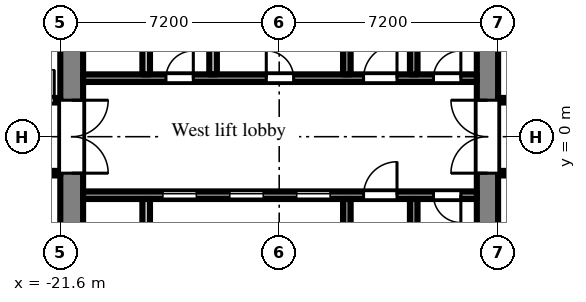
"""IFC4 building model, lengths in metres.
Left out: names, types, materials, properties, quantities, classifications, styles, units other than length and angle.
Written with IfcOpenShell. Run it as: python <this file> out.ifc"""

import sys

from ifc_helpers import new_model, si_unit, direction, frame, frame_2d, origin, place, context, subcontext, project, spatial, rectangle, extrude, element, fill, save


model = new_model("IFC4")
c1 = context("Model", 3, precision=1e-05, world=origin(), true_north=direction((0.0, 1.0)))
c2 = subcontext(c1, "Body", "Model", "MODEL_VIEW")
j1 = project(units=[si_unit("LENGTHUNIT", "METRE"), si_unit("PLANEANGLEUNIT", "RADIAN")], contexts=[c1])
p1 = place(None, origin())
s1 = spatial("IfcSite", under=j1, at=p1, CompositionType="ELEMENT")
p2 = place(p1, origin())
s2 = spatial("IfcBuilding", under=s1, at=p2, CompositionType="ELEMENT")
p3 = place(p2, frame((0.0, 0.0, 53.7)))
s3 = spatial("IfcBuildingStorey", under=s2, at=p3, CompositionType="ELEMENT", Elevation=53.7)
p4 = place(p3, frame((-7.55, -7.2, 0.0), z_axis=(0.0, 0.0, 1.0), x_axis=(0.0, 1.0, 0.0)))
e1 = element("IfcWall", 1, at=p4, inside=s3, PredefinedType="SHEAR", context=c2, shape_type="SweptSolid", body=[
    extrude(rectangle(XDim=14.4, YDim=0.7, at=frame_2d((7.2, 0.0))), origin(), (0.0, 0.0, 1.0), 2.575),
])
p5 = place(p4, frame((6.0, 0.0, 0.0)))
e2 = element("IfcOpeningElement", 2, at=p5, cuts=e1, PredefinedType="OPENING", context=c2, shape_type="SweptSolid", body=[
    extrude(rectangle(XDim=2.4, YDim=2.2, at=frame_2d((1.2, 1.1))), frame((0.0, 0.36, 0.0), z_axis=(0.0, -1.0, 0.0), x_axis=(1.0, 0.0, 0.0)), (0.0, 0.0, 1.0), 0.72),
])
p6 = place(p3, frame((-21.225, -7.2, 0.0), z_axis=(0.0, 0.0, 1.0), x_axis=(0.0, 1.0, 0.0)))
e3 = element("IfcWall", 3, at=p6, inside=s3, PredefinedType="SHEAR", context=c2, shape_type="SweptSolid", body=[
    extrude(rectangle(XDim=14.4, YDim=0.75, at=frame_2d((7.2, 0.0))), origin(), (0.0, 0.0, 1.0), 2.575),
])
p7 = place(p6, frame((6.0, 0.0, 0.0)))
e4 = element("IfcOpeningElement", 4, at=p7, cuts=e3, PredefinedType="OPENING", context=c2, shape_type="SweptSolid", body=[
    extrude(rectangle(XDim=2.4, YDim=2.2, at=frame_2d((1.2, 1.1))), frame((0.0, 0.385, 0.0), z_axis=(0.0, -1.0, 0.0), x_axis=(1.0, 0.0, 0.0)), (0.0, 0.0, 1.0), 0.77),
])
p8 = place(p3, frame((-7.9, 1.925, 0.0), z_axis=(0.0, 0.0, 1.0), x_axis=(-1.0, 0.0, 0.0)))
e5 = element("IfcWall", 5, at=p8, inside=s3, PredefinedType="SHEAR", context=c2, shape_type="SweptSolid", body=[
    extrude(rectangle(XDim=12.95, YDim=0.25, at=frame_2d((6.475, 0.0))), origin(), (0.0, 0.0, 1.0), 2.575),
])
p9 = place(p8, frame((0.525, 0.0, 0.0)))
e6 = element("IfcOpeningElement", 6, at=p9, cuts=e5, PredefinedType="OPENING", context=c2, shape_type="SweptSolid", body=[
    extrude(rectangle(XDim=0.9, YDim=2.1, at=frame_2d((0.45, 1.05))), frame((0.0, 0.135, 0.0), z_axis=(0.0, -1.0, 0.0), x_axis=(1.0, 0.0, 0.0)), (0.0, 0.0, 1.0), 0.27),
])
p10 = place(p8, frame((2.625, 0.0, 0.0)))
e7 = element("IfcOpeningElement", 7, at=p10, cuts=e5, PredefinedType="OPENING", context=c2, shape_type="SweptSolid", body=[
    extrude(rectangle(XDim=1.1, YDim=2.1, at=frame_2d((0.55, 1.05))), frame((0.0, 0.135, 0.0), z_axis=(0.0, -1.0, 0.0), x_axis=(1.0, 0.0, 0.0)), (0.0, 0.0, 1.0), 0.27),
])
p11 = place(p8, frame((6.025, 0.0, 0.0)))
e8 = element("IfcOpeningElement", 8, at=p11, cuts=e5, PredefinedType="OPENING", context=c2, shape_type="SweptSolid", body=[
    extrude(rectangle(XDim=0.9, YDim=2.1, at=frame_2d((0.45, 1.05))), frame((0.0, 0.135, 0.0), z_axis=(0.0, -1.0, 0.0), x_axis=(1.0, 0.0, 0.0)), (0.0, 0.0, 1.0), 0.27),
])
p12 = place(p8, frame((9.325, 0.0, 0.0)))
e9 = element("IfcOpeningElement", 9, at=p12, cuts=e5, PredefinedType="OPENING", context=c2, shape_type="SweptSolid", body=[
    extrude(rectangle(XDim=0.9, YDim=2.1, at=frame_2d((0.45, 1.05))), frame((0.0, 0.135, 0.0), z_axis=(0.0, -1.0, 0.0), x_axis=(1.0, 0.0, 0.0)), (0.0, 0.0, 1.0), 0.27),
])
p13 = place(p3, frame((-9.975, 2.05, 0.0), z_axis=(0.0, 0.0, 1.0), x_axis=(0.0, 1.0, 0.0)))
e10 = element("IfcWall", 10, at=p13, inside=s3, PredefinedType="SHEAR", context=c2, shape_type="SweptSolid", body=[
    extrude(rectangle(XDim=4.65, YDim=0.25, at=frame_2d((2.325, 0.0))), origin(), (0.0, 0.0, 1.0), 2.575),
])
p14 = place(p13, frame((2.95, 0.0, 0.0)))
e11 = element("IfcOpeningElement", 11, at=p14, cuts=e10, PredefinedType="OPENING", context=c2, shape_type="SweptSolid", body=[
    extrude(rectangle(XDim=1.1, YDim=2.1, at=frame_2d((0.55, 1.05))), frame((0.0, 0.135, 0.0), z_axis=(0.0, -1.0, 0.0), x_axis=(1.0, 0.0, 0.0)), (0.0, 0.0, 1.0), 0.27),
])
p15 = place(p3, frame((-12.175, 2.05, 0.0), z_axis=(0.0, 0.0, 1.0), x_axis=(0.0, 1.0, 0.0)))
e12 = element("IfcWall", 12, at=p15, inside=s3, PredefinedType="SHEAR", context=c2, shape_type="SweptSolid", body=[
    extrude(rectangle(XDim=4.65, YDim=0.25, at=frame_2d((2.325, 0.0))), origin(), (0.0, 0.0, 1.0), 2.575),
])
p16 = place(p15, frame((2.95, 0.0, 0.0)))
e13 = element("IfcOpeningElement", 13, at=p16, cuts=e12, PredefinedType="OPENING", context=c2, shape_type="SweptSolid", body=[
    extrude(rectangle(XDim=1.1, YDim=2.1, at=frame_2d((0.55, 1.05))), frame((0.0, 0.135, 0.0), z_axis=(0.0, -1.0, 0.0), x_axis=(1.0, 0.0, 0.0)), (0.0, 0.0, 1.0), 0.27),
])
for number, where, z_axis, x_axis in (
    (14, (-16.575, 2.05, 0.0), (0.0, 0.0, 1.0), (0.0, 1.0, 0.0)),
    (15, (-18.775, 2.05, 0.0), (0.0, 0.0, 1.0), (0.0, 1.0, 0.0)),
):
    element("IfcWall", number, at=place(p3, frame(where, z_axis=z_axis, x_axis=x_axis)), inside=s3, PredefinedType="PARTITIONING", context=c2, shape_type="SweptSolid", body=[
        extrude(rectangle(XDim=2.1, YDim=0.25, at=frame_2d((1.05, 0.0))), origin(), (0.0, 0.0, 1.0), 2.575),
    ])
p17 = place(p3, frame((-7.9, -1.925, 0.0), z_axis=(0.0, 0.0, 1.0), x_axis=(-1.0, 0.0, 0.0)))
e16 = element("IfcWall", 16, at=p17, inside=s3, PredefinedType="SHEAR", context=c2, shape_type="SweptSolid", body=[
    extrude(rectangle(XDim=12.95, YDim=0.25, at=frame_2d((6.475, 0.0))), origin(), (0.0, 0.0, 1.0), 2.575),
])
p18 = place(p17, frame((4.825, 0.0, 0.0)))
e17 = element("IfcOpeningElement", 17, at=p18, cuts=e16, PredefinedType="OPENING", context=c2, shape_type="SweptSolid", body=[
    extrude(rectangle(XDim=1.1, YDim=2.1, at=frame_2d((0.55, 1.05))), frame((0.0, 0.135, 0.0), z_axis=(0.0, -1.0, 0.0), x_axis=(1.0, 0.0, 0.0)), (0.0, 0.0, 1.0), 0.27),
])
p19 = place(p17, frame((7.025, 0.0, 0.0)))
e18 = element("IfcOpeningElement", 18, at=p19, cuts=e16, PredefinedType="OPENING", context=c2, shape_type="SweptSolid", body=[
    extrude(rectangle(XDim=1.1, YDim=2.1, at=frame_2d((0.55, 1.05))), frame((0.0, 0.135, 0.0), z_axis=(0.0, -1.0, 0.0), x_axis=(1.0, 0.0, 0.0)), (0.0, 0.0, 1.0), 0.27),
])
p20 = place(p17, frame((9.225, 0.0, 0.0)))
e19 = element("IfcOpeningElement", 19, at=p20, cuts=e16, PredefinedType="OPENING", context=c2, shape_type="SweptSolid", body=[
    extrude(rectangle(XDim=1.1, YDim=2.1, at=frame_2d((0.55, 1.05))), frame((0.0, 0.135, 0.0), z_axis=(0.0, -1.0, 0.0), x_axis=(1.0, 0.0, 0.0)), (0.0, 0.0, 1.0), 0.27),
])
p21 = place(p17, frame((0.525, 0.0, 0.0)))
e20 = element("IfcOpeningElement", 20, at=p21, cuts=e16, PredefinedType="OPENING", context=c2, shape_type="SweptSolid", body=[
    extrude(rectangle(XDim=0.9, YDim=2.1, at=frame_2d((0.45, 1.05))), frame((0.0, 0.135, 0.0), z_axis=(0.0, -1.0, 0.0), x_axis=(1.0, 0.0, 0.0)), (0.0, 0.0, 1.0), 0.27),
])
p22 = place(p17, frame((2.625, 0.0, 0.0)))
e21 = element("IfcOpeningElement", 21, at=p22, cuts=e16, PredefinedType="OPENING", context=c2, shape_type="SweptSolid", body=[
    extrude(rectangle(XDim=1.1, YDim=2.1, at=frame_2d((0.55, 1.05))), frame((0.0, 0.135, 0.0), z_axis=(0.0, -1.0, 0.0), x_axis=(1.0, 0.0, 0.0)), (0.0, 0.0, 1.0), 0.27),
])
p23 = place(p3, frame((-9.975, -2.05, 0.0), z_axis=(0.0, 0.0, 1.0), x_axis=(0.0, -1.0, 0.0)))
e22 = element("IfcWall", 22, at=p23, inside=s3, PredefinedType="SHEAR", context=c2, shape_type="SweptSolid", body=[
    extrude(rectangle(XDim=4.65, YDim=0.25, at=frame_2d((2.325, 0.0))), origin(), (0.0, 0.0, 1.0), 2.575),
])
p24 = place(p23, frame((2.95, 0.0, 0.0)))
e23 = element("IfcOpeningElement", 23, at=p24, cuts=e22, PredefinedType="OPENING", context=c2, shape_type="SweptSolid", body=[
    extrude(rectangle(XDim=1.1, YDim=2.1, at=frame_2d((0.55, 1.05))), frame((0.0, 0.135, 0.0), z_axis=(0.0, -1.0, 0.0), x_axis=(1.0, 0.0, 0.0)), (0.0, 0.0, 1.0), 0.27),
])
p25 = place(p3, frame((-12.175, -2.05, 0.0), z_axis=(0.0, 0.0, 1.0), x_axis=(0.0, -1.0, 0.0)))
e24 = element("IfcWall", 24, at=p25, inside=s3, PredefinedType="SHEAR", context=c2, shape_type="SweptSolid", body=[
    extrude(rectangle(XDim=4.65, YDim=0.25, at=frame_2d((2.325, 0.0))), origin(), (0.0, 0.0, 1.0), 2.575),
])
p26 = place(p25, frame((2.95, 0.0, 0.0)))
e25 = element("IfcOpeningElement", 25, at=p26, cuts=e24, PredefinedType="OPENING", context=c2, shape_type="SweptSolid", body=[
    extrude(rectangle(XDim=1.1, YDim=2.1, at=frame_2d((0.55, 1.05))), frame((0.0, 0.135, 0.0), z_axis=(0.0, -1.0, 0.0), x_axis=(1.0, 0.0, 0.0)), (0.0, 0.0, 1.0), 0.27),
])
p27 = place(p3, frame((-18.775, -2.05, 0.0), z_axis=(0.0, 0.0, 1.0), x_axis=(0.0, -1.0, 0.0)))
e26 = element("IfcWall", 26, at=p27, inside=s3, PredefinedType="PARTITIONING", context=c2, shape_type="SweptSolid", body=[
    extrude(rectangle(XDim=2.1, YDim=0.25, at=frame_2d((1.05, 0.0))), origin(), (0.0, 0.0, 1.0), 2.575),
])
p28 = place(p3, frame((-36.5, -1.2, 0.0), z_axis=(0.0, 0.0, 1.0), x_axis=(1.0, 0.0, 0.0)))
e27 = element("IfcWall", 27, at=p28, inside=s3, PredefinedType="PARTITIONING", context=c2, shape_type="SweptSolid", body=[
    extrude(rectangle(XDim=14.9, YDim=0.15, at=frame_2d((7.45, 0.0))), origin(), (0.0, 0.0, 1.0), 2.575),
])
p29 = place(p28, frame((10.4, 0.0, 0.0)))
e28 = element("IfcOpeningElement", 28, at=p29, cuts=e27, PredefinedType="OPENING", context=c2, shape_type="SweptSolid", body=[
    extrude(rectangle(XDim=1.8, YDim=2.1, at=frame_2d((0.9, 1.05))), frame((0.0, 0.085, 0.0), z_axis=(0.0, -1.0, 0.0), x_axis=(1.0, 0.0, 0.0)), (0.0, 0.0, 1.0), 0.17),
])
p30 = place(p28, frame((6.35, 0.0, 0.0)))
e29 = element("IfcOpeningElement", 29, at=p30, cuts=e27, PredefinedType="OPENING", context=c2, shape_type="SweptSolid", body=[
    extrude(rectangle(XDim=0.9, YDim=2.1, at=frame_2d((0.45, 1.05))), frame((0.0, 0.085, 0.0), z_axis=(0.0, -1.0, 0.0), x_axis=(1.0, 0.0, 0.0)), (0.0, 0.0, 1.0), 0.17),
])
p31 = place(p28, frame((4.55, 0.0, 0.0)))
e30 = element("IfcOpeningElement", 30, at=p31, cuts=e27, PredefinedType="OPENING", context=c2, shape_type="SweptSolid", body=[
    extrude(rectangle(XDim=0.9, YDim=2.1, at=frame_2d((0.45, 1.05))), frame((0.0, 0.085, 0.0), z_axis=(0.0, -1.0, 0.0), x_axis=(1.0, 0.0, 0.0)), (0.0, 0.0, 1.0), 0.17),
])
p32 = place(p28, frame((1.15, 0.0, 0.0)))
e31 = element("IfcOpeningElement", 31, at=p32, cuts=e27, PredefinedType="OPENING", context=c2, shape_type="SweptSolid", body=[
    extrude(rectangle(XDim=1.8, YDim=2.1, at=frame_2d((0.9, 1.05))), frame((0.0, 0.085, 0.0), z_axis=(0.0, -1.0, 0.0), x_axis=(1.0, 0.0, 0.0)), (0.0, 0.0, 1.0), 0.17),
])
p33 = place(p3, frame((-36.5, 1.2, 0.0), z_axis=(0.0, 0.0, 1.0), x_axis=(1.0, 0.0, 0.0)))
e32 = element("IfcWall", 32, at=p33, inside=s3, PredefinedType="PARTITIONING", context=c2, shape_type="SweptSolid", body=[
    extrude(rectangle(XDim=14.9, YDim=0.15, at=frame_2d((7.45, 0.0))), origin(), (0.0, 0.0, 1.0), 2.575),
])
p34 = place(p33, frame((13.7, 0.0, 0.0)))
e33 = element("IfcOpeningElement", 33, at=p34, cuts=e32, PredefinedType="OPENING", context=c2, shape_type="SweptSolid", body=[
    extrude(rectangle(XDim=1.0, YDim=2.1, at=frame_2d((0.5, 1.05))), frame((0.0, 0.085, 0.0), z_axis=(0.0, -1.0, 0.0), x_axis=(1.0, 0.0, 0.0)), (0.0, 0.0, 1.0), 0.17),
])
p35 = place(p33, frame((8.19, 0.0, 0.0)))
e34 = element("IfcOpeningElement", 34, at=p35, cuts=e32, PredefinedType="OPENING", context=c2, shape_type="SweptSolid", body=[
    extrude(rectangle(XDim=1.0, YDim=2.1, at=frame_2d((0.5, 1.05))), frame((0.0, 0.085, 0.0), z_axis=(0.0, -1.0, 0.0), x_axis=(1.0, 0.0, 0.0)), (0.0, 0.0, 1.0), 0.17),
])
p36 = place(p33, frame((1.15, 0.0, 0.0)))
e35 = element("IfcOpeningElement", 35, at=p36, cuts=e32, PredefinedType="OPENING", context=c2, shape_type="SweptSolid", body=[
    extrude(rectangle(XDim=1.8, YDim=2.1, at=frame_2d((0.9, 1.05))), frame((0.0, 0.085, 0.0), z_axis=(0.0, -1.0, 0.0), x_axis=(1.0, 0.0, 0.0)), (0.0, 0.0, 1.0), 0.17),
])
p37 = place(p3, frame((-7.2, -1.2, 0.0), z_axis=(0.0, 0.0, 1.0), x_axis=(1.0, 0.0, 0.0)))
e36 = element("IfcWall", 36, at=p37, inside=s3, PredefinedType="PARTITIONING", context=c2, shape_type="SweptSolid", body=[
    extrude(rectangle(XDim=6.075, YDim=0.15, at=frame_2d((3.038, 0.0))), origin(), (0.0, 0.0, 1.0), 2.575),
])
p38 = place(p37, frame((2.55, 0.0, 0.0)))
e37 = element("IfcOpeningElement", 37, at=p38, cuts=e36, PredefinedType="OPENING", context=c2, shape_type="SweptSolid", body=[
    extrude(rectangle(XDim=0.9, YDim=2.1, at=frame_2d((0.45, 1.05))), frame((0.0, 0.085, 0.0), z_axis=(0.0, -1.0, 0.0), x_axis=(1.0, 0.0, 0.0)), (0.0, 0.0, 1.0), 0.17),
])
p39 = place(p37, frame((0.55, 0.0, 0.0)))
e38 = element("IfcOpeningElement", 38, at=p39, cuts=e36, PredefinedType="OPENING", context=c2, shape_type="SweptSolid", body=[
    extrude(rectangle(XDim=0.9, YDim=2.1, at=frame_2d((0.45, 1.05))), frame((0.0, 0.085, 0.0), z_axis=(0.0, -1.0, 0.0), x_axis=(1.0, 0.0, 0.0)), (0.0, 0.0, 1.0), 0.17),
])
p40 = place(p3, frame((-7.2, 1.2, 0.0), z_axis=(0.0, 0.0, 1.0), x_axis=(1.0, 0.0, 0.0)))
e39 = element("IfcWall", 39, at=p40, inside=s3, PredefinedType="PARTITIONING", context=c2, shape_type="SweptSolid", body=[
    extrude(rectangle(XDim=6.075, YDim=0.15, at=frame_2d((3.038, 0.0))), origin(), (0.0, 0.0, 1.0), 2.575),
])
p41 = place(p40, frame((2.55, 0.0, 0.0)))
e40 = element("IfcOpeningElement", 40, at=p41, cuts=e39, PredefinedType="OPENING", context=c2, shape_type="SweptSolid", body=[
    extrude(rectangle(XDim=0.9, YDim=2.1, at=frame_2d((0.45, 1.05))), frame((0.0, 0.085, 0.0), z_axis=(0.0, -1.0, 0.0), x_axis=(1.0, 0.0, 0.0)), (0.0, 0.0, 1.0), 0.17),
])
p42 = place(p40, frame((0.55, 0.0, 0.0)))
e41 = element("IfcOpeningElement", 41, at=p42, cuts=e39, PredefinedType="OPENING", context=c2, shape_type="SweptSolid", body=[
    extrude(rectangle(XDim=0.9, YDim=2.1, at=frame_2d((0.45, 1.05))), frame((0.0, 0.085, 0.0), z_axis=(0.0, -1.0, 0.0), x_axis=(1.0, 0.0, 0.0)), (0.0, 0.0, 1.0), 0.17),
])
p43 = place(p18, origin())
e42 = element("IfcDoor", 42, at=p43, inside=s3, OperationType="SLIDING_TO_LEFT", PredefinedType="DOOR", context=c2, shape_type="SweptSolid", body=[
    extrude(rectangle(XDim=1.1, YDim=2.1, at=frame_2d((0.55, 1.05))), frame((0.0, 0.025, 0.0), z_axis=(0.0, -1.0, 0.0), x_axis=(1.0, 0.0, 0.0)), (0.0, 0.0, 1.0), 0.05),
])
fill(e17, e42)
p44 = place(p19, origin())
e43 = element("IfcDoor", 43, at=p44, inside=s3, OperationType="SLIDING_TO_LEFT", PredefinedType="DOOR", context=c2, shape_type="SweptSolid", body=[
    extrude(rectangle(XDim=1.1, YDim=2.1, at=frame_2d((0.55, 1.05))), frame((0.0, 0.025, 0.0), z_axis=(0.0, -1.0, 0.0), x_axis=(1.0, 0.0, 0.0)), (0.0, 0.0, 1.0), 0.05),
])
fill(e18, e43)
p45 = place(p20, origin())
e44 = element("IfcDoor", 44, at=p45, inside=s3, OperationType="SLIDING_TO_LEFT", PredefinedType="DOOR", context=c2, shape_type="SweptSolid", body=[
    extrude(rectangle(XDim=1.1, YDim=2.1, at=frame_2d((0.55, 1.05))), frame((0.0, 0.025, 0.0), z_axis=(0.0, -1.0, 0.0), x_axis=(1.0, 0.0, 0.0)), (0.0, 0.0, 1.0), 0.05),
])
fill(e19, e44)
p46 = place(p9, frame((0.9, 0.0, 0.0), z_axis=(0.0, 0.0, 1.0), x_axis=(-1.0, 0.0, 0.0)))
e45 = element("IfcDoor", 45, at=p46, inside=s3, OperationType="SINGLE_SWING_RIGHT", PredefinedType="DOOR", context=c2, shape_type="SweptSolid", body=[
    extrude(rectangle(XDim=0.9, YDim=2.1, at=frame_2d((0.45, 1.05))), frame((0.0, 0.025, 0.0), z_axis=(0.0, -1.0, 0.0), x_axis=(1.0, 0.0, 0.0)), (0.0, 0.0, 1.0), 0.05),
])
fill(e6, e45)
p47 = place(p21, origin())
e46 = element("IfcDoor", 46, at=p47, inside=s3, OperationType="SINGLE_SWING_LEFT", PredefinedType="DOOR", context=c2, shape_type="SweptSolid", body=[
    extrude(rectangle(XDim=0.9, YDim=2.1, at=frame_2d((0.45, 1.05))), frame((0.0, 0.025, 0.0), z_axis=(0.0, -1.0, 0.0), x_axis=(1.0, 0.0, 0.0)), (0.0, 0.0, 1.0), 0.05),
])
fill(e20, e46)
p48 = place(p10, frame((1.1, 0.0, 0.0), z_axis=(0.0, 0.0, 1.0), x_axis=(-1.0, 0.0, 0.0)))
e47 = element("IfcDoor", 47, at=p48, inside=s3, OperationType="SINGLE_SWING_RIGHT", PredefinedType="DOOR", context=c2, shape_type="SweptSolid", body=[
    extrude(rectangle(XDim=1.1, YDim=2.1, at=frame_2d((0.55, 1.05))), frame((0.0, 0.025, 0.0), z_axis=(0.0, -1.0, 0.0), x_axis=(1.0, 0.0, 0.0)), (0.0, 0.0, 1.0), 0.05),
])
fill(e7, e47)
p49 = place(p22, frame((1.1, 0.0, 0.0), z_axis=(0.0, 0.0, 1.0), x_axis=(-1.0, 0.0, 0.0)))
e48 = element("IfcDoor", 48, at=p49, inside=s3, OperationType="SINGLE_SWING_RIGHT", PredefinedType="DOOR", context=c2, shape_type="SweptSolid", body=[
    extrude(rectangle(XDim=1.1, YDim=2.1, at=frame_2d((0.55, 1.05))), frame((0.0, 0.025, 0.0), z_axis=(0.0, -1.0, 0.0), x_axis=(1.0, 0.0, 0.0)), (0.0, 0.0, 1.0), 0.05),
])
fill(e21, e48)
p50 = place(p5, origin())
e49 = element("IfcDoor", 49, at=p50, inside=s3, OperationType="DOUBLE_DOOR_DOUBLE_SWING", PredefinedType="DOOR", context=c2, shape_type="SweptSolid", body=[
    extrude(rectangle(XDim=2.4, YDim=2.2, at=frame_2d((1.2, 1.1))), frame((0.0, 0.025, 0.0), z_axis=(0.0, -1.0, 0.0), x_axis=(1.0, 0.0, 0.0)), (0.0, 0.0, 1.0), 0.05),
])
fill(e2, e49)
p51 = place(p7, frame((2.4, 0.0, 0.0), z_axis=(0.0, 0.0, 1.0), x_axis=(-1.0, 0.0, 0.0)))
e50 = element("IfcDoor", 50, at=p51, inside=s3, OperationType="DOUBLE_DOOR_DOUBLE_SWING", PredefinedType="DOOR", context=c2, shape_type="SweptSolid", body=[
    extrude(rectangle(XDim=2.4, YDim=2.2, at=frame_2d((1.2, 1.1))), frame((0.0, 0.025, 0.0), z_axis=(0.0, -1.0, 0.0), x_axis=(1.0, 0.0, 0.0)), (0.0, 0.0, 1.0), 0.05),
])
fill(e4, e50)
p52 = place(p11, frame((0.9, 0.0, 0.0), z_axis=(0.0, 0.0, 1.0), x_axis=(-1.0, 0.0, 0.0)))
e51 = element("IfcDoor", 51, at=p52, inside=s3, OperationType="SINGLE_SWING_LEFT", PredefinedType="DOOR", context=c2, shape_type="SweptSolid", body=[
    extrude(rectangle(XDim=0.9, YDim=2.1, at=frame_2d((0.45, 1.05))), frame((0.0, 0.025, 0.0), z_axis=(0.0, -1.0, 0.0), x_axis=(1.0, 0.0, 0.0)), (0.0, 0.0, 1.0), 0.05),
])
fill(e8, e51)
p53 = place(p12, frame((0.9, 0.0, 0.0), z_axis=(0.0, 0.0, 1.0), x_axis=(-1.0, 0.0, 0.0)))
e52 = element("IfcDoor", 52, at=p53, inside=s3, OperationType="SINGLE_SWING_RIGHT", PredefinedType="DOOR", context=c2, shape_type="SweptSolid", body=[
    extrude(rectangle(XDim=0.9, YDim=2.1, at=frame_2d((0.45, 1.05))), frame((0.0, 0.025, 0.0), z_axis=(0.0, -1.0, 0.0), x_axis=(1.0, 0.0, 0.0)), (0.0, 0.0, 1.0), 0.05),
])
fill(e9, e52)
p54 = place(p34, origin())
e53 = element("IfcDoor", 53, at=p54, inside=s3, OperationType="SINGLE_SWING_RIGHT", PredefinedType="DOOR", context=c2, shape_type="SweptSolid", body=[
    extrude(rectangle(XDim=1.0, YDim=2.1, at=frame_2d((0.5, 1.05))), frame((0.0, 0.025, 0.0), z_axis=(0.0, -1.0, 0.0), x_axis=(1.0, 0.0, 0.0)), (0.0, 0.0, 1.0), 0.05),
])
fill(e33, e53)
save(model, sys.argv[1])
